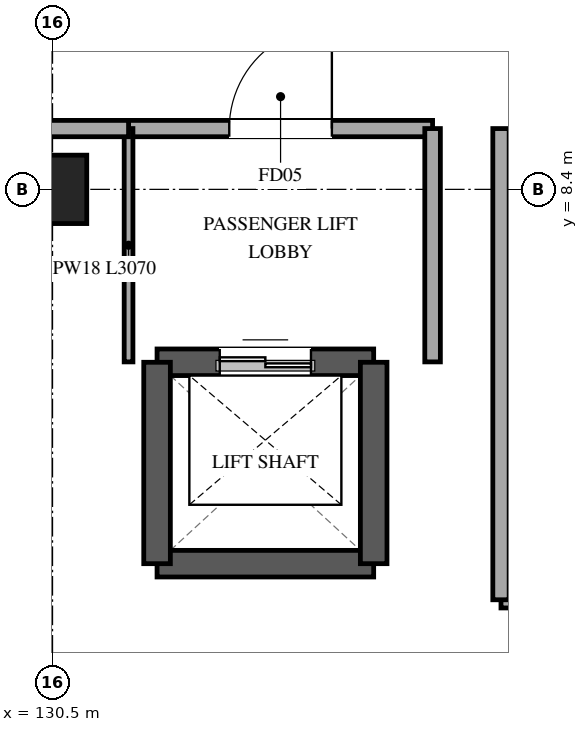
"""IFC4 building model, lengths in metres.
Left out: names, types, materials, properties, quantities, classifications, styles, units other than length and angle.
Written with IfcOpenShell. Run it as: python <this file> out.ifc"""

import sys

from ifc_helpers import new_model, si_unit, direction, frame, frame_2d, origin, origin_2d, place, context, subcontext, project, spatial, rectangle, extrude, element, fill, save


model = new_model("IFC4")
c1 = context("Model", 3, precision=1e-05, world=origin(), true_north=direction((0.0, 1.0)))
c2 = subcontext(c1, "Body", "Model", "MODEL_VIEW")
j1 = project(units=[si_unit("LENGTHUNIT", "METRE"), si_unit("PLANEANGLEUNIT", "RADIAN")], contexts=[c1])
p1 = place(None, origin())
s1 = spatial("IfcSite", under=j1, at=p1, CompositionType="ELEMENT")
p2 = place(p1, origin())
s2 = spatial("IfcBuilding", under=s1, at=p2, CompositionType="ELEMENT")
p3 = place(p2, frame((0.0, 0.0, 6.0)))
s3 = spatial("IfcBuildingStorey", under=s2, at=p3, CompositionType="ELEMENT", Elevation=6.0)
p4 = place(p3, frame((130.5, 8.4, 0.0), z_axis=(0.0, 0.0, 1.0), x_axis=(1.0, 0.0, 0.0)))
e1 = element("IfcColumn", 1, at=p4, inside=s3, PredefinedType="COLUMN", context=c2, shape_type="SweptSolid", body=[
    extrude(rectangle(XDim=0.9, YDim=0.9, at=origin_2d()), origin(), (0.0, 0.0, 1.0), 5.4),
])
p5 = place(p3, frame((131.875, 6.125, 0.0), z_axis=(0.0, 0.0, 1.0), x_axis=(1.0, 0.0, 0.0)))
e2 = element("IfcWall", 2, at=p5, inside=s3, PredefinedType="SHEAR", context=c2, shape_type="SweptSolid", body=[
    extrude(rectangle(XDim=2.85, YDim=0.35, at=frame_2d((1.425, 0.0))), origin(), (0.0, 0.0, 1.0), 5.4),
])
p6 = place(p5, frame((0.825, 0.0, 0.0)))
e3 = element("IfcOpeningElement", 3, at=p6, cuts=e2, PredefinedType="OPENING", context=c2, shape_type="SweptSolid", body=[
    extrude(rectangle(XDim=1.2, YDim=2.2, at=frame_2d((0.6, 1.1))), frame((0.0, 0.185, 0.0), z_axis=(0.0, -1.0, 0.0), x_axis=(1.0, 0.0, 0.0)), (0.0, 0.0, 1.0), 0.37),
])
p7 = place(p3, frame((134.725, 3.475, 0.0), z_axis=(0.0, 0.0, 1.0), x_axis=(-1.0, 0.0, 0.0)))
e4 = element("IfcWall", 4, at=p7, inside=s3, PredefinedType="SHEAR", context=c2, shape_type="SweptSolid", body=[
    extrude(rectangle(XDim=2.85, YDim=0.35, at=frame_2d((1.425, 0.0))), origin(), (0.0, 0.0, 1.0), 5.4),
])
for number, where, z_axis, x_axis in (
    (5, (131.875, 3.475, 0.0), (0.0, 0.0, 1.0), (0.0, 1.0, 0.0)),
    (6, (134.725, 6.125, 0.0), (0.0, 0.0, 1.0), (0.0, -1.0, 0.0)),
):
    element("IfcWall", number, at=place(p3, frame(where, z_axis=z_axis, x_axis=x_axis)), inside=s3, PredefinedType="SHEAR", context=c2, shape_type="SweptSolid", body=[
        extrude(rectangle(XDim=2.65, YDim=0.35, at=frame_2d((1.325, 0.0))), origin(), (0.0, 0.0, 1.0), 5.4),
    ])
p8 = place(p3, frame((131.5, 9.2, 0.0), z_axis=(0.0, 0.0, 1.0), x_axis=(1.0, 0.0, 0.0)))
e7 = element("IfcWall", 7, at=p8, inside=s3, PredefinedType="PARTITIONING", context=c2, shape_type="SweptSolid", body=[
    extrude(rectangle(XDim=4.0, YDim=0.215, at=frame_2d((2.0, 0.0))), origin(), (0.0, 0.0, 1.0), 5.06),
])
p9 = place(p8, frame((1.325, 0.0, 0.0)))
e8 = element("IfcOpeningElement", 8, at=p9, cuts=e7, PredefinedType="OPENING", context=c2, shape_type="SweptSolid", body=[
    extrude(rectangle(XDim=1.35, YDim=2.2, at=frame_2d((0.675, 1.1))), frame((0.0, 0.118, 0.0), z_axis=(0.0, -1.0, 0.0), x_axis=(1.0, 0.0, 0.0)), (0.0, 0.0, 1.0), 0.235),
])
p10 = place(p3, frame((131.5, 6.13, 0.0), z_axis=(0.0, 0.0, 1.0), x_axis=(0.0, 1.0, 0.0)))
e9 = element("IfcWall", 9, at=p10, inside=s3, PredefinedType="PARTITIONING", context=c2, shape_type="SweptSolid", body=[
    extrude(rectangle(XDim=3.07, YDim=0.115, at=frame_2d((1.535, 0.0))), origin(), (0.0, 0.0, 1.0), 4.295),
])
p11 = place(p3, frame((135.5, 9.2, 0.0), z_axis=(0.0, 0.0, 1.0), x_axis=(0.0, -1.0, 0.0)))
e10 = element("IfcWall", 10, at=p11, inside=s3, PredefinedType="PARTITIONING", context=c2, shape_type="SweptSolid", body=[
    extrude(rectangle(XDim=3.07, YDim=0.205, at=frame_2d((1.535, 0.0))), origin(), (0.0, 0.0, 1.0), 4.295),
])
p12 = place(p3, frame((131.5, 9.2, 0.0), z_axis=(0.0, 0.0, 1.0), x_axis=(-1.0, 0.0, 0.0)))
e11 = element("IfcWall", 11, at=p12, inside=s3, PredefinedType="PARTITIONING", context=c2, shape_type="SweptSolid", body=[
    extrude(rectangle(XDim=9.7, YDim=0.215, at=frame_2d((4.85, 0.0))), origin(), (0.0, 0.0, 1.0), 4.295),
])
p13 = place(p3, frame((140.75, 3.0, 0.0), z_axis=(0.0, 0.0, 1.0), x_axis=(-1.0, 0.0, 0.0)))
e12 = element("IfcWall", 12, at=p13, inside=s3, PredefinedType="PARTITIONING", context=c2, shape_type="SweptSolid", body=[
    extrude(rectangle(XDim=4.35, YDim=0.215, at=frame_2d((2.175, 0.0))), origin(), (0.0, 0.0, 1.0), 4.295),
])
p14 = place(p3, frame((136.4, 3.0, 0.0), z_axis=(0.0, 0.0, 1.0), x_axis=(0.0, 1.0, 0.0)))
e13 = element("IfcWall", 13, at=p14, inside=s3, PredefinedType="PARTITIONING", context=c2, shape_type="SweptSolid", body=[
    extrude(rectangle(XDim=6.2, YDim=0.215, at=frame_2d((3.1, 0.0))), origin(), (0.0, 0.0, 1.0), 4.295),
])
p15 = place(p6, origin())
e14 = element("IfcDoor", 14, at=p15, inside=s3, OperationType="DOUBLE_DOOR_SLIDING", PredefinedType="DOOR", context=c2, shape_type="SweptSolid", body=[
    extrude(rectangle(XDim=1.2, YDim=2.2, at=frame_2d((0.6, 1.1))), frame((0.0, 0.025, 0.0), z_axis=(0.0, -1.0, 0.0), x_axis=(1.0, 0.0, 0.0)), (0.0, 0.0, 1.0), 0.05),
])
fill(e3, e14)
p16 = place(p9, origin())
e15 = element("IfcDoor", 15, at=p16, inside=s3, OperationType="SINGLE_SWING_RIGHT", PredefinedType="DOOR", context=c2, shape_type="SweptSolid", body=[
    extrude(rectangle(XDim=1.35, YDim=2.2, at=frame_2d((0.675, 1.1))), frame((0.0, 0.025, 0.0), z_axis=(0.0, -1.0, 0.0), x_axis=(1.0, 0.0, 0.0)), (0.0, 0.0, 1.0), 0.05),
])
fill(e8, e15)
save(model, sys.argv[1])
